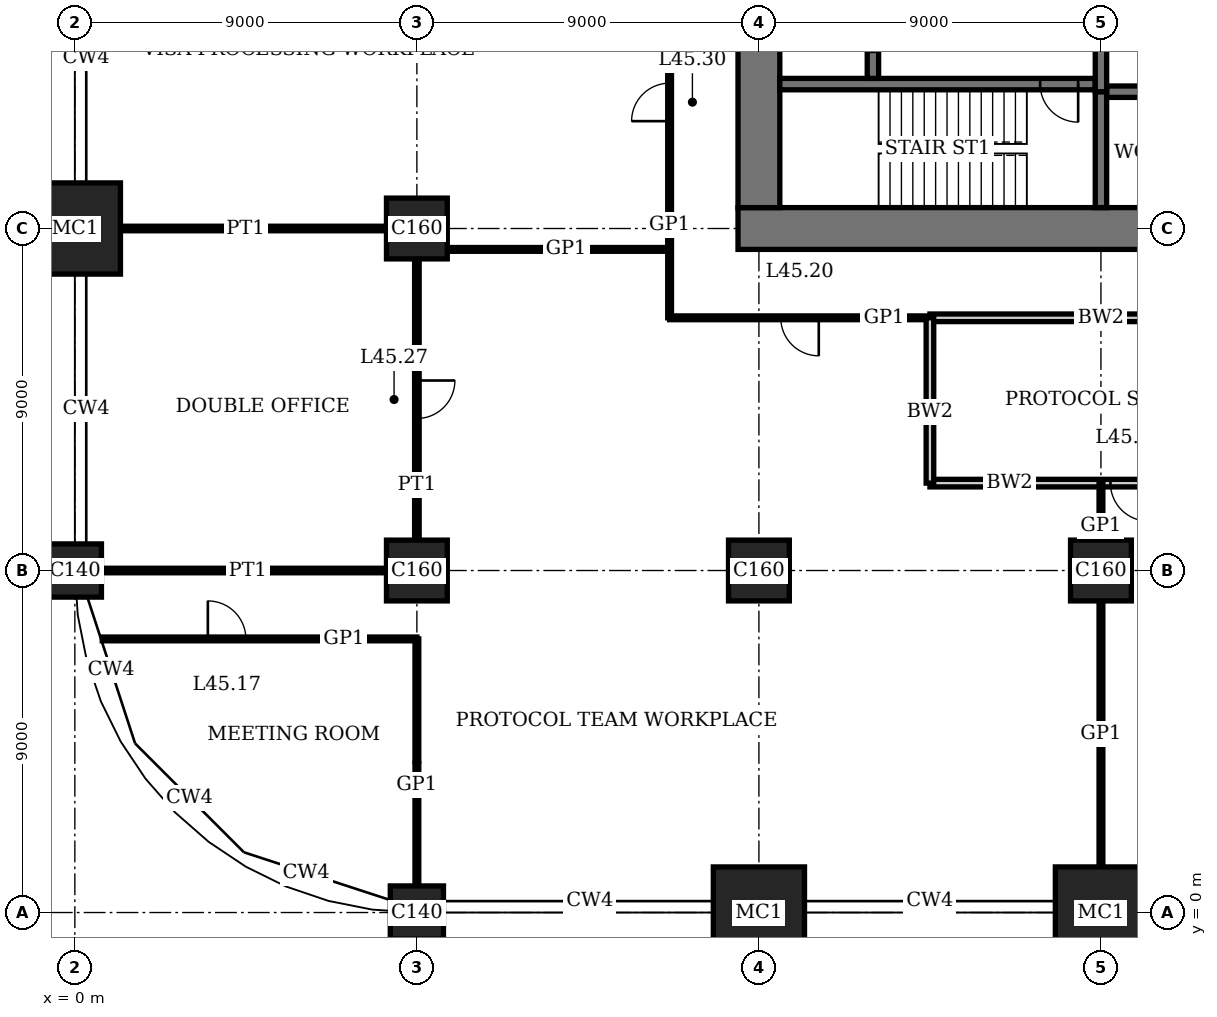
"""IFC4 building model, lengths in metres.
Left out: names, types, materials, properties, quantities, classifications, styles, units other than length and angle.
Written with IfcOpenShell. Run it as: python <this file> out.ifc"""

import sys

from ifc_helpers import new_model, si_unit, direction, frame, frame_2d, origin, origin_2d, place, context, subcontext, project, spatial, rectangle, extrude, element, fill, save


model = new_model("IFC4")
c1 = context("Model", 3, precision=1e-05, world=origin(), true_north=direction((0.0, 1.0)))
c2 = subcontext(c1, "Body", "Model", "MODEL_VIEW")
j1 = project(units=[si_unit("LENGTHUNIT", "METRE"), si_unit("PLANEANGLEUNIT", "RADIAN")], contexts=[c1])
p1 = place(None, origin())
s1 = spatial("IfcSite", under=j1, at=p1, CompositionType="ELEMENT")
p2 = place(p1, origin())
s2 = spatial("IfcBuilding", under=s1, at=p2, CompositionType="ELEMENT")
p3 = place(p2, frame((0.0, 0.0, 186.2)))
s3 = spatial("IfcBuildingStorey", under=s2, at=p3, CompositionType="ELEMENT", Elevation=186.2)
p4 = place(p3, frame((0.0, 9.0, 0.0), z_axis=(0.0, 0.0, 1.0), x_axis=(1.0, 0.0, 0.0)))
e1 = element("IfcColumn", 1, at=p4, inside=s3, PredefinedType="COLUMN", context=c2, shape_type="SweptSolid", body=[
    extrude(rectangle(XDim=1.4, YDim=1.4, at=origin_2d()), origin(), (0.0, 0.0, 1.0), 4.0),
])
p5 = place(p3, frame((0.0, 18.0, 0.0), z_axis=(0.0, 0.0, 1.0), x_axis=(1.0, 0.0, 0.0)))
e2 = element("IfcColumn", 2, at=p5, inside=s3, PredefinedType="COLUMN", context=c2, shape_type="SweptSolid", body=[
    extrude(rectangle(XDim=2.4, YDim=2.4, at=origin_2d()), origin(), (0.0, 0.0, 1.0), 4.0),
])
p6 = place(p3, frame((9.0, 0.0, 0.0), z_axis=(0.0, 0.0, 1.0), x_axis=(1.0, 0.0, 0.0)))
e3 = element("IfcColumn", 3, at=p6, inside=s3, PredefinedType="COLUMN", context=c2, shape_type="SweptSolid", body=[
    extrude(rectangle(XDim=1.4, YDim=1.4, at=origin_2d()), origin(), (0.0, 0.0, 1.0), 4.0),
])
for number, where, z_axis, x_axis in (
    (4, (9.0, 9.0, 0.0), (0.0, 0.0, 1.0), (1.0, 0.0, 0.0)),
    (5, (9.0, 18.0, 0.0), (0.0, 0.0, 1.0), (1.0, 0.0, 0.0)),
):
    element("IfcColumn", number, at=place(p3, frame(where, z_axis=z_axis, x_axis=x_axis)), inside=s3, PredefinedType="COLUMN", context=c2, shape_type="SweptSolid", body=[
        extrude(rectangle(XDim=1.6, YDim=1.6, at=origin_2d()), origin(), (0.0, 0.0, 1.0), 4.0),
    ])
p7 = place(p3, frame((18.0, 0.0, 0.0), z_axis=(0.0, 0.0, 1.0), x_axis=(1.0, 0.0, 0.0)))
e6 = element("IfcColumn", 6, at=p7, inside=s3, PredefinedType="COLUMN", context=c2, shape_type="SweptSolid", body=[
    extrude(rectangle(XDim=2.4, YDim=2.4, at=origin_2d()), origin(), (0.0, 0.0, 1.0), 4.0),
])
p8 = place(p3, frame((18.0, 9.0, 0.0), z_axis=(0.0, 0.0, 1.0), x_axis=(1.0, 0.0, 0.0)))
e7 = element("IfcColumn", 7, at=p8, inside=s3, PredefinedType="COLUMN", context=c2, shape_type="SweptSolid", body=[
    extrude(rectangle(XDim=1.6, YDim=1.6, at=origin_2d()), origin(), (0.0, 0.0, 1.0), 4.0),
])
p9 = place(p3, frame((27.0, 0.0, 0.0), z_axis=(0.0, 0.0, 1.0), x_axis=(1.0, 0.0, 0.0)))
e8 = element("IfcColumn", 8, at=p9, inside=s3, PredefinedType="COLUMN", context=c2, shape_type="SweptSolid", body=[
    extrude(rectangle(XDim=2.4, YDim=2.4, at=origin_2d()), origin(), (0.0, 0.0, 1.0), 4.0),
])
p10 = place(p3, frame((27.0, 9.0, 0.0), z_axis=(0.0, 0.0, 1.0), x_axis=(1.0, 0.0, 0.0)))
e9 = element("IfcColumn", 9, at=p10, inside=s3, PredefinedType="COLUMN", context=c2, shape_type="SweptSolid", body=[
    extrude(rectangle(XDim=1.6, YDim=1.6, at=origin_2d()), origin(), (0.0, 0.0, 1.0), 4.0),
])
p11 = place(p3, frame((17.45, 18.0, 0.0), z_axis=(0.0, 0.0, 1.0), x_axis=(1.0, 0.0, 0.0)))
e10 = element("IfcWall", 10, at=p11, inside=s3, PredefinedType="SHEAR", context=c2, shape_type="SweptSolid", body=[
    extrude(rectangle(XDim=28.1, YDim=1.1, at=frame_2d((14.05, 0.0))), origin(), (0.0, 0.0, 1.0), 4.0),
])
p12 = place(p11, frame((11.55, 0.0, 0.0)))
e11 = element("IfcOpeningElement", 11, at=p12, cuts=e10, PredefinedType="OPENING", context=c2, shape_type="SweptSolid", body=[
    extrude(rectangle(XDim=1.0, YDim=2.4, at=frame_2d((0.5, 1.2))), frame((0.0, 0.56, 0.0), z_axis=(0.0, -1.0, 0.0), x_axis=(1.0, 0.0, 0.0)), (0.0, 0.0, 1.0), 1.12),
])
p13 = place(p11, frame((16.55, 0.0, 0.0)))
e12 = element("IfcOpeningElement", 12, at=p13, cuts=e10, PredefinedType="OPENING", context=c2, shape_type="SweptSolid", body=[
    extrude(rectangle(XDim=1.0, YDim=2.4, at=frame_2d((0.5, 1.2))), frame((0.0, 0.56, 0.0), z_axis=(0.0, -1.0, 0.0), x_axis=(1.0, 0.0, 0.0)), (0.0, 0.0, 1.0), 1.12),
])
p14 = place(p11, frame((20.0, 0.0, 0.0)))
e13 = element("IfcOpeningElement", 13, at=p14, cuts=e10, PredefinedType="OPENING", context=c2, shape_type="SweptSolid", body=[
    extrude(rectangle(XDim=1.1, YDim=2.4, at=frame_2d((0.55, 1.2))), frame((0.0, 0.56, 0.0), z_axis=(0.0, -1.0, 0.0), x_axis=(1.0, 0.0, 0.0)), (0.0, 0.0, 1.0), 1.12),
])
p15 = place(p11, frame((24.05, 0.0, 0.0)))
e14 = element("IfcOpeningElement", 14, at=p15, cuts=e10, PredefinedType="OPENING", context=c2, shape_type="SweptSolid", body=[
    extrude(rectangle(XDim=1.0, YDim=2.4, at=frame_2d((0.5, 1.2))), frame((0.0, 0.56, 0.0), z_axis=(0.0, -1.0, 0.0), x_axis=(1.0, 0.0, 0.0)), (0.0, 0.0, 1.0), 1.12),
])
p16 = place(p3, frame((18.0, 35.45, 0.0), z_axis=(0.0, 0.0, 1.0), x_axis=(0.0, -1.0, 0.0)))
e15 = element("IfcWall", 15, at=p16, inside=s3, PredefinedType="SHEAR", context=c2, shape_type="SweptSolid", body=[
    extrude(rectangle(XDim=16.9, YDim=1.1, at=frame_2d((8.45, 0.0))), origin(), (0.0, 0.0, 1.0), 4.0),
])
p17 = place(p16, frame((8.45, 0.0, 0.0)))
e16 = element("IfcOpeningElement", 16, at=p17, cuts=e15, PredefinedType="OPENING", context=c2, shape_type="SweptSolid", body=[
    extrude(rectangle(XDim=1.8, YDim=2.4, at=frame_2d((0.9, 1.2))), frame((0.0, 0.56, 0.0), z_axis=(0.0, -1.0, 0.0), x_axis=(1.0, 0.0, 0.0)), (0.0, 0.0, 1.0), 1.12),
])
p18 = place(p3, frame((18.55, 21.8, 0.0), z_axis=(0.0, 0.0, 1.0), x_axis=(1.0, 0.0, 0.0)))
e17 = element("IfcWall", 17, at=p18, inside=s3, PredefinedType="SHEAR", context=c2, shape_type="SweptSolid", body=[
    extrude(rectangle(XDim=8.3, YDim=0.3, at=frame_2d((4.15, 0.0))), origin(), (0.0, 0.0, 1.0), 4.0),
])
p19 = place(p18, frame((6.85, 0.0, 0.0)))
e18 = element("IfcOpeningElement", 18, at=p19, cuts=e17, PredefinedType="OPENING", context=c2, shape_type="SweptSolid", body=[
    extrude(rectangle(XDim=1.0, YDim=2.4, at=frame_2d((0.5, 1.2))), frame((0.0, 0.16, 0.0), z_axis=(0.0, -1.0, 0.0), x_axis=(1.0, 0.0, 0.0)), (0.0, 0.0, 1.0), 0.32),
])
p20 = place(p3, frame((27.0, 18.55, 0.0), z_axis=(0.0, 0.0, 1.0), x_axis=(0.0, 1.0, 0.0)))
e19 = element("IfcWall", 19, at=p20, inside=s3, PredefinedType="SHEAR", context=c2, shape_type="SweptSolid", body=[
    extrude(rectangle(XDim=3.05, YDim=0.3, at=frame_2d((1.525, 0.0))), origin(), (0.0, 0.0, 1.0), 4.0),
])
p21 = place(p3, frame((21.0, 21.95, 0.0), z_axis=(0.0, 0.0, 1.0), x_axis=(0.0, 1.0, 0.0)))
e20 = element("IfcWall", 20, at=p21, inside=s3, PredefinedType="SHEAR", context=c2, shape_type="SweptSolid", body=[
    extrude(rectangle(XDim=2.5, YDim=0.3, at=frame_2d((1.25, 0.0))), origin(), (0.0, 0.0, 1.0), 4.0),
])
p22 = place(p21, frame((0.7, 0.0, 0.0)))
e21 = element("IfcOpeningElement", 21, at=p22, cuts=e20, PredefinedType="OPENING", context=c2, shape_type="SweptSolid", body=[
    extrude(rectangle(XDim=1.1, YDim=2.4, at=frame_2d((0.55, 1.2))), frame((0.0, 0.16, 0.0), z_axis=(0.0, -1.0, 0.0), x_axis=(1.0, 0.0, 0.0)), (0.0, 0.0, 1.0), 0.32),
])
p23 = place(p3, frame((27.15, 21.6, 0.0), z_axis=(0.0, 0.0, 1.0), x_axis=(1.0, 0.0, 0.0)))
e22 = element("IfcWall", 22, at=p23, inside=s3, PredefinedType="SHEAR", context=c2, shape_type="SweptSolid", body=[
    extrude(rectangle(XDim=17.3, YDim=0.3, at=frame_2d((8.65, 0.0))), origin(), (0.0, 0.0, 1.0), 4.0),
])
p24 = place(p3, frame((27.0, 21.6, 0.0), z_axis=(0.0, 0.0, 1.0), x_axis=(0.0, 1.0, 0.0)))
e23 = element("IfcWall", 23, at=p24, inside=s3, PredefinedType="SHEAR", context=c2, shape_type="SweptSolid", body=[
    extrude(rectangle(XDim=2.85, YDim=0.3, at=frame_2d((1.425, 0.0))), origin(), (0.0, 0.0, 1.0), 4.0),
])
p25 = place(p3, frame((0.72, 7.2, 0.0), z_axis=(0.0, 0.0, 1.0), x_axis=(1.0, 0.0, 0.0)))
e24 = element("IfcWall", 24, at=p25, inside=s3, PredefinedType="PARTITIONING", context=c2, shape_type="SweptSolid", body=[
    extrude(rectangle(XDim=8.28, YDim=0.1, at=frame_2d((4.14, 0.0))), origin(), (0.0, 0.0, 1.0), 3.75),
])
p26 = place(p25, frame((2.78, 0.0, 0.0)))
e25 = element("IfcOpeningElement", 25, at=p26, cuts=e24, PredefinedType="OPENING", context=c2, shape_type="SweptSolid", body=[
    extrude(rectangle(XDim=1.0, YDim=2.4, at=frame_2d((0.5, 1.2))), frame((0.0, 0.06, 0.0), z_axis=(0.0, -1.0, 0.0), x_axis=(1.0, 0.0, 0.0)), (0.0, 0.0, 1.0), 0.12),
])
p27 = place(p3, frame((0.7, 9.0, 0.0), z_axis=(0.0, 0.0, 1.0), x_axis=(1.0, 0.0, 0.0)))
e26 = element("IfcWall", 26, at=p27, inside=s3, PredefinedType="PARTITIONING", context=c2, shape_type="SweptSolid", body=[
    extrude(rectangle(XDim=7.5, YDim=0.12, at=frame_2d((3.75, 0.0))), origin(), (0.0, 0.0, 1.0), 3.05),
])
p28 = place(p3, frame((22.5, 11.3, 0.0), z_axis=(0.0, 0.0, 1.0), x_axis=(1.0, 0.0, 0.0)))
e27 = element("IfcWall", 27, at=p28, inside=s3, PredefinedType="SOLIDWALL", context=c2, shape_type="SweptSolid", body=[
    extrude(rectangle(XDim=9.0, YDim=0.2, at=frame_2d((4.5, 0.0))), origin(), (0.0, 0.0, 1.0), 3.75),
])
p29 = place(p28, frame((4.75, 0.0, 0.0)))
e28 = element("IfcOpeningElement", 28, at=p29, cuts=e27, PredefinedType="OPENING", context=c2, shape_type="SweptSolid", body=[
    extrude(rectangle(XDim=1.0, YDim=2.4, at=frame_2d((0.5, 1.2))), frame((0.0, 0.11, 0.0), z_axis=(0.0, -1.0, 0.0), x_axis=(1.0, 0.0, 0.0)), (0.0, 0.0, 1.0), 0.22),
])
p30 = place(p3, frame((22.5, 15.65, 0.0), z_axis=(0.0, 0.0, 1.0), x_axis=(1.0, 0.0, 0.0)))
e29 = element("IfcWall", 29, at=p30, inside=s3, PredefinedType="SOLIDWALL", context=c2, shape_type="SweptSolid", body=[
    extrude(rectangle(XDim=9.0, YDim=0.2, at=frame_2d((4.5, 0.0))), origin(), (0.0, 0.0, 1.0), 3.75),
])
p31 = place(p3, frame((15.65, 15.65, 0.0), z_axis=(0.0, 0.0, 1.0), x_axis=(1.0, 0.0, 0.0)))
e30 = element("IfcWall", 30, at=p31, inside=s3, PredefinedType="PARTITIONING", context=c2, shape_type="SweptSolid", body=[
    extrude(rectangle(XDim=6.85, YDim=0.1, at=frame_2d((3.425, 0.0))), origin(), (0.0, 0.0, 1.0), 3.75),
])
p32 = place(p31, frame((2.925, 0.0, 0.0)))
e31 = element("IfcOpeningElement", 31, at=p32, cuts=e30, PredefinedType="OPENING", context=c2, shape_type="SweptSolid", body=[
    extrude(rectangle(XDim=1.0, YDim=2.4, at=frame_2d((0.5, 1.2))), frame((0.0, 0.06, 0.0), z_axis=(0.0, -1.0, 0.0), x_axis=(1.0, 0.0, 0.0)), (0.0, 0.0, 1.0), 0.12),
])
p33 = place(p3, frame((9.8, 17.45, 0.0), z_axis=(0.0, 0.0, 1.0), x_axis=(1.0, 0.0, 0.0)))
e32 = element("IfcWall", 32, at=p33, inside=s3, PredefinedType="PARTITIONING", context=c2, shape_type="SweptSolid", body=[
    extrude(rectangle(XDim=5.85, YDim=0.1, at=frame_2d((2.925, 0.0))), origin(), (0.0, 0.0, 1.0), 3.75),
])
p34 = place(p3, frame((1.2, 18.0, 0.0), z_axis=(0.0, 0.0, 1.0), x_axis=(1.0, 0.0, 0.0)))
e33 = element("IfcWall", 33, at=p34, inside=s3, PredefinedType="PARTITIONING", context=c2, shape_type="SweptSolid", body=[
    extrude(rectangle(XDim=7.0, YDim=0.12, at=frame_2d((3.5, 0.0))), origin(), (0.0, 0.0, 1.0), 3.05),
])
p35 = place(p3, frame((9.0, 9.8, 0.0), z_axis=(0.0, 0.0, 1.0), x_axis=(0.0, 1.0, 0.0)))
e34 = element("IfcWall", 34, at=p35, inside=s3, PredefinedType="PARTITIONING", context=c2, shape_type="SweptSolid", body=[
    extrude(rectangle(XDim=7.4, YDim=0.12, at=frame_2d((3.7, 0.0))), origin(), (0.0, 0.0, 1.0), 3.05),
])
p36 = place(p35, frame((3.2, 0.0, 0.0)))
e35 = element("IfcOpeningElement", 35, at=p36, cuts=e34, PredefinedType="OPENING", context=c2, shape_type="SweptSolid", body=[
    extrude(rectangle(XDim=1.0, YDim=2.4, at=frame_2d((0.5, 1.2))), frame((0.0, 0.07, 0.0), z_axis=(0.0, -1.0, 0.0), x_axis=(1.0, 0.0, 0.0)), (0.0, 0.0, 1.0), 0.14),
])
p37 = place(p3, frame((9.0, 0.7, 0.0), z_axis=(0.0, 0.0, 1.0), x_axis=(0.0, 1.0, 0.0)))
e36 = element("IfcWall", 36, at=p37, inside=s3, PredefinedType="PARTITIONING", context=c2, shape_type="SweptSolid", body=[
    extrude(rectangle(XDim=6.5, YDim=0.1, at=frame_2d((3.25, 0.0))), origin(), (0.0, 0.0, 1.0), 3.05),
])
p38 = place(p3, frame((15.65, 15.65, 0.0), z_axis=(0.0, 0.0, 1.0), x_axis=(0.0, 1.0, 0.0)))
e37 = element("IfcWall", 37, at=p38, inside=s3, PredefinedType="PARTITIONING", context=c2, shape_type="SweptSolid", body=[
    extrude(rectangle(XDim=11.35, YDim=0.1, at=frame_2d((5.675, 0.0))), origin(), (0.0, 0.0, 1.0), 3.75),
])
p39 = place(p38, frame((5.175, 0.0, 0.0)))
e38 = element("IfcOpeningElement", 38, at=p39, cuts=e37, PredefinedType="OPENING", context=c2, shape_type="SweptSolid", body=[
    extrude(rectangle(XDim=1.0, YDim=2.4, at=frame_2d((0.5, 1.2))), frame((0.0, 0.06, 0.0), z_axis=(0.0, -1.0, 0.0), x_axis=(1.0, 0.0, 0.0)), (0.0, 0.0, 1.0), 0.12),
])
p40 = place(p3, frame((22.5, 11.3, 0.0), z_axis=(0.0, 0.0, 1.0), x_axis=(0.0, 1.0, 0.0)))
e39 = element("IfcWall", 39, at=p40, inside=s3, PredefinedType="SOLIDWALL", context=c2, shape_type="SweptSolid", body=[
    extrude(rectangle(XDim=4.35, YDim=0.2, at=frame_2d((2.175, 0.0))), origin(), (0.0, 0.0, 1.0), 3.75),
])
p41 = place(p3, frame((27.0, 1.2, 0.0), z_axis=(0.0, 0.0, 1.0), x_axis=(0.0, 1.0, 0.0)))
e40 = element("IfcWall", 40, at=p41, inside=s3, PredefinedType="PARTITIONING", context=c2, shape_type="SweptSolid", body=[
    extrude(rectangle(XDim=7.0, YDim=0.1, at=frame_2d((3.5, 0.0))), origin(), (0.0, 0.0, 1.0), 3.05),
])
p42 = place(p3, frame((27.0, 9.8, 0.0), z_axis=(0.0, 0.0, 1.0), x_axis=(0.0, 1.0, 0.0)))
e41 = element("IfcWall", 41, at=p42, inside=s3, PredefinedType="PARTITIONING", context=c2, shape_type="SweptSolid", body=[
    extrude(rectangle(XDim=1.51, YDim=0.1, at=frame_2d((0.755, 0.0))), origin(), (0.0, 0.0, 1.0), 3.05),
])
p43 = place(p19, origin())
e42 = element("IfcDoor", 42, at=p43, inside=s3, OperationType="SINGLE_SWING_RIGHT", PredefinedType="DOOR", context=c2, shape_type="SweptSolid", body=[
    extrude(rectangle(XDim=1.0, YDim=2.4, at=frame_2d((0.5, 1.2))), frame((0.0, 0.03, 0.0), z_axis=(0.0, -1.0, 0.0), x_axis=(1.0, 0.0, 0.0)), (0.0, 0.0, 1.0), 0.06),
])
fill(e18, e42)
p44 = place(p26, origin())
e43 = element("IfcDoor", 43, at=p44, inside=s3, OperationType="SINGLE_SWING_RIGHT", PredefinedType="DOOR", context=c2, shape_type="SweptSolid", body=[
    extrude(rectangle(XDim=1.0, YDim=2.4, at=frame_2d((0.5, 1.2))), frame((0.0, 0.02, 0.0), z_axis=(0.0, -1.0, 0.0), x_axis=(1.0, 0.0, 0.0)), (0.0, 0.0, 1.0), 0.04),
])
fill(e25, e43)
p45 = place(p29, origin())
e44 = element("IfcDoor", 44, at=p45, inside=s3, OperationType="SINGLE_SWING_RIGHT", PredefinedType="DOOR", context=c2, shape_type="SweptSolid", body=[
    extrude(rectangle(XDim=1.0, YDim=2.4, at=frame_2d((0.5, 1.2))), frame((0.0, 0.035, 0.0), z_axis=(0.0, -1.0, 0.0), x_axis=(1.0, 0.0, 0.0)), (0.0, 0.0, 1.0), 0.07),
])
fill(e28, e44)
p46 = place(p32, origin())
e45 = element("IfcDoor", 45, at=p46, inside=s3, OperationType="SINGLE_SWING_RIGHT", PredefinedType="DOOR", context=c2, shape_type="SweptSolid", body=[
    extrude(rectangle(XDim=1.0, YDim=2.4, at=frame_2d((0.5, 1.2))), frame((0.0, 0.02, 0.0), z_axis=(0.0, -1.0, 0.0), x_axis=(1.0, 0.0, 0.0)), (0.0, 0.0, 1.0), 0.04),
])
fill(e31, e45)
p47 = place(p36, origin())
e46 = element("IfcDoor", 46, at=p47, inside=s3, OperationType="SINGLE_SWING_RIGHT", PredefinedType="DOOR", context=c2, shape_type="SweptSolid", body=[
    extrude(rectangle(XDim=1.0, YDim=2.4, at=frame_2d((0.5, 1.2))), frame((0.0, 0.025, 0.0), z_axis=(0.0, -1.0, 0.0), x_axis=(1.0, 0.0, 0.0)), (0.0, 0.0, 1.0), 0.05),
])
fill(e35, e46)
p48 = place(p39, origin())
e47 = element("IfcDoor", 47, at=p48, inside=s3, OperationType="SINGLE_SWING_RIGHT", PredefinedType="DOOR", context=c2, shape_type="SweptSolid", body=[
    extrude(rectangle(XDim=1.0, YDim=2.4, at=frame_2d((0.5, 1.2))), frame((0.0, 0.02, 0.0), z_axis=(0.0, -1.0, 0.0), x_axis=(1.0, 0.0, 0.0)), (0.0, 0.0, 1.0), 0.04),
])
fill(e38, e47)
save(model, sys.argv[1])
